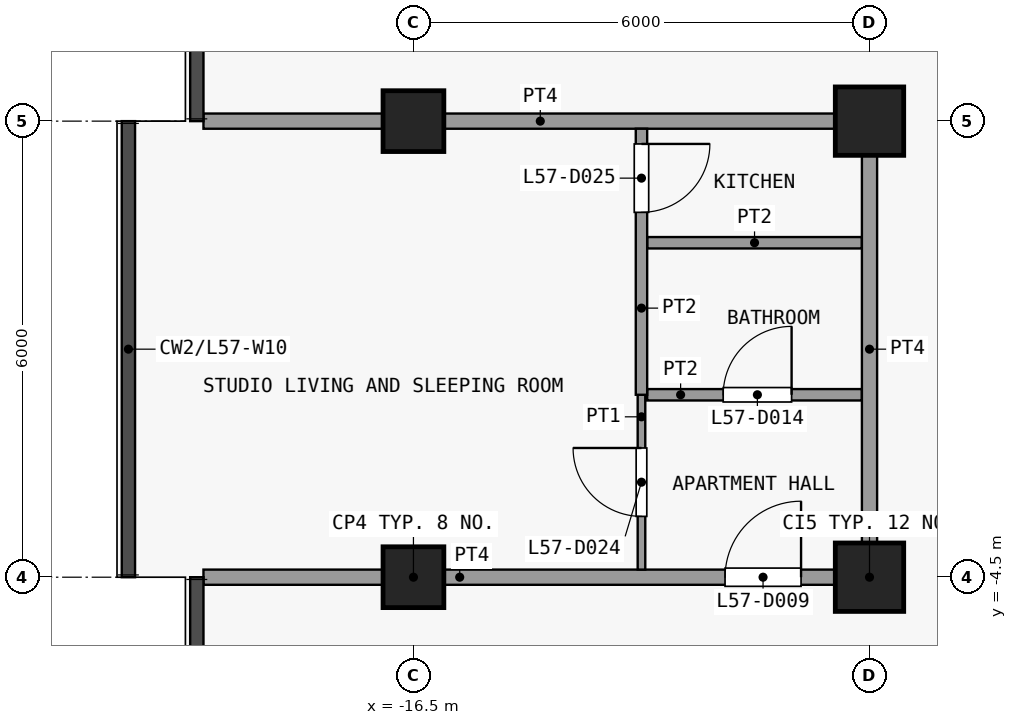
"""IFC4 building model, lengths in metres.
Left out: names, types, materials, properties, quantities, classifications, styles, units other than length and angle.
Written with IfcOpenShell. Run it as: python <this file> out.ifc"""

import sys

from ifc_helpers import new_model, si_unit, direction, frame, frame_2d, origin, origin_2d, place, context, subcontext, project, spatial, rectangle, extrude, element, fill, save


model = new_model("IFC4")
c1 = context("Model", 3, precision=1e-05, world=origin(), true_north=direction((0.0, 1.0)))
c2 = subcontext(c1, "Body", "Model", "MODEL_VIEW")
j1 = project(units=[si_unit("LENGTHUNIT", "METRE"), si_unit("PLANEANGLEUNIT", "RADIAN")], contexts=[c1])
p1 = place(None, origin())
s1 = spatial("IfcSite", under=j1, at=p1, CompositionType="ELEMENT")
p2 = place(p1, origin())
s2 = spatial("IfcBuilding", under=s1, at=p2, CompositionType="ELEMENT")
p3 = place(p2, frame((0.0, 0.0, 226.7)))
s3 = spatial("IfcBuildingStorey", under=s2, at=p3, CompositionType="ELEMENT", Elevation=226.7)
for number, where, z_axis, x_axis in (
    (1, (-16.5, -4.5, 0.0), (0.0, 0.0, 1.0), (1.0, 0.0, 0.0)),
    (2, (-16.5, 1.5, 0.0), (0.0, 0.0, 1.0), (1.0, 0.0, 0.0)),
):
    element("IfcColumn", number, at=place(p3, frame(where, z_axis=z_axis, x_axis=x_axis)), inside=s3, PredefinedType="COLUMN", context=c2, shape_type="SweptSolid", body=[
        extrude(rectangle(XDim=0.8, YDim=0.8, at=origin_2d()), origin(), (0.0, 0.0, 1.0), 3.6),
    ])
for number, where, z_axis, x_axis in (
    (3, (-10.5, -4.5, 0.0), (0.0, 0.0, 1.0), (1.0, 0.0, 0.0)),
    (4, (-10.5, 1.5, 0.0), (0.0, 0.0, 1.0), (1.0, 0.0, 0.0)),
):
    element("IfcColumn", number, at=place(p3, frame(where, z_axis=z_axis, x_axis=x_axis)), inside=s3, PredefinedType="COLUMN", context=c2, shape_type="SweptSolid", body=[
        extrude(rectangle(XDim=0.9, YDim=0.9, at=origin_2d()), origin(), (0.0, 0.0, 1.0), 3.6),
    ])
p4 = place(p3, frame((-19.262, -4.5, 0.0), z_axis=(0.0, 0.0, 1.0), x_axis=(1.0, 0.0, 0.0)))
e5 = element("IfcWall", 5, at=p4, inside=s3, PredefinedType="PARTITIONING", context=c2, shape_type="SweptSolid", body=[
    extrude(rectangle(XDim=8.863, YDim=0.2, at=frame_2d((4.431, 0.0))), origin(), (0.0, 0.0, 1.0), 3.3),
])
p5 = place(p4, frame((6.862, 0.0, 0.0)))
e6 = element("IfcOpeningElement", 6, at=p5, cuts=e5, PredefinedType="OPENING", context=c2, shape_type="SweptSolid", body=[
    extrude(rectangle(XDim=1.0, YDim=2.1, at=frame_2d((0.5, 1.05))), frame((0.0, 0.11, 0.0), z_axis=(0.0, -1.0, 0.0), x_axis=(1.0, 0.0, 0.0)), (0.0, 0.0, 1.0), 0.22),
])
p6 = place(p3, frame((-13.425, -2.1, 0.0), z_axis=(0.0, 0.0, 1.0), x_axis=(1.0, 0.0, 0.0)))
e7 = element("IfcWall", 7, at=p6, inside=s3, PredefinedType="PARTITIONING", context=c2, shape_type="SweptSolid", body=[
    extrude(rectangle(XDim=2.825, YDim=0.15, at=frame_2d((1.413, 0.0))), origin(), (0.0, 0.0, 1.0), 3.3),
])
p7 = place(p6, frame((1.0, 0.0, 0.0)))
e8 = element("IfcOpeningElement", 8, at=p7, cuts=e7, PredefinedType="OPENING", context=c2, shape_type="SweptSolid", body=[
    extrude(rectangle(XDim=0.9, YDim=2.1, at=frame_2d((0.45, 1.05))), frame((0.0, 0.085, 0.0), z_axis=(0.0, -1.0, 0.0), x_axis=(1.0, 0.0, 0.0)), (0.0, 0.0, 1.0), 0.17),
])
p8 = place(p3, frame((-13.425, -0.1, 0.0), z_axis=(0.0, 0.0, 1.0), x_axis=(1.0, 0.0, 0.0)))
e9 = element("IfcWall", 9, at=p8, inside=s3, PredefinedType="PARTITIONING", context=c2, shape_type="SweptSolid", body=[
    extrude(rectangle(XDim=2.825, YDim=0.15, at=frame_2d((1.413, 0.0))), origin(), (0.0, 0.0, 1.0), 3.3),
])
p9 = place(p3, frame((-19.262, 1.5, 0.0), z_axis=(0.0, 0.0, 1.0), x_axis=(1.0, 0.0, 0.0)))
e10 = element("IfcWall", 10, at=p9, inside=s3, PredefinedType="PARTITIONING", context=c2, shape_type="SweptSolid", body=[
    extrude(rectangle(XDim=8.863, YDim=0.2, at=frame_2d((4.431, 0.0))), origin(), (0.0, 0.0, 1.0), 3.3),
])
p10 = place(p3, frame((-13.5, -4.4, 0.0), z_axis=(0.0, 0.0, 1.0), x_axis=(0.0, 1.0, 0.0)))
e11 = element("IfcWall", 11, at=p10, inside=s3, PredefinedType="PARTITIONING", context=c2, shape_type="SweptSolid", body=[
    extrude(rectangle(XDim=2.3, YDim=0.1, at=frame_2d((1.15, 0.0))), origin(), (0.0, 0.0, 1.0), 3.3),
])
p11 = place(p10, frame((0.7, 0.0, 0.0)))
e12 = element("IfcOpeningElement", 12, at=p11, cuts=e11, PredefinedType="OPENING", context=c2, shape_type="SweptSolid", body=[
    extrude(rectangle(XDim=0.9, YDim=2.1, at=frame_2d((0.45, 1.05))), frame((0.0, 0.06, 0.0), z_axis=(0.0, -1.0, 0.0), x_axis=(1.0, 0.0, 0.0)), (0.0, 0.0, 1.0), 0.12),
])
p12 = place(p3, frame((-13.5, -2.1, 0.0), z_axis=(0.0, 0.0, 1.0), x_axis=(0.0, 1.0, 0.0)))
e13 = element("IfcWall", 13, at=p12, inside=s3, PredefinedType="PARTITIONING", context=c2, shape_type="SweptSolid", body=[
    extrude(rectangle(XDim=3.5, YDim=0.15, at=frame_2d((1.75, 0.0))), origin(), (0.0, 0.0, 1.0), 3.3),
])
p13 = place(p12, frame((2.4, 0.0, 0.0)))
e14 = element("IfcOpeningElement", 14, at=p13, cuts=e13, PredefinedType="OPENING", context=c2, shape_type="SweptSolid", body=[
    extrude(rectangle(XDim=0.9, YDim=2.1, at=frame_2d((0.45, 1.05))), frame((0.0, 0.085, 0.0), z_axis=(0.0, -1.0, 0.0), x_axis=(1.0, 0.0, 0.0)), (0.0, 0.0, 1.0), 0.17),
])
p14 = place(p3, frame((-10.5, -4.4, 0.0), z_axis=(0.0, 0.0, 1.0), x_axis=(0.0, 1.0, 0.0)))
e15 = element("IfcWall", 15, at=p14, inside=s3, PredefinedType="PARTITIONING", context=c2, shape_type="SweptSolid", body=[
    extrude(rectangle(XDim=5.8, YDim=0.2, at=frame_2d((2.9, 0.0))), origin(), (0.0, 0.0, 1.0), 3.3),
])
p15 = place(p5, origin())
e16 = element("IfcDoor", 16, at=p15, inside=s3, OperationType="SINGLE_SWING_LEFT", PredefinedType="DOOR", context=c2, shape_type="SweptSolid", body=[
    extrude(rectangle(XDim=1.0, YDim=2.1, at=frame_2d((0.5, 1.05))), frame((0.0, 0.025, 0.0), z_axis=(0.0, -1.0, 0.0), x_axis=(1.0, 0.0, 0.0)), (0.0, 0.0, 1.0), 0.05),
])
fill(e6, e16)
p16 = place(p7, origin())
e17 = element("IfcDoor", 17, at=p16, inside=s3, OperationType="SINGLE_SWING_LEFT", PredefinedType="DOOR", context=c2, shape_type="SweptSolid", body=[
    extrude(rectangle(XDim=0.9, YDim=2.1, at=frame_2d((0.45, 1.05))), frame((0.0, 0.025, 0.0), z_axis=(0.0, -1.0, 0.0), x_axis=(1.0, 0.0, 0.0)), (0.0, 0.0, 1.0), 0.05),
])
fill(e8, e17)
p17 = place(p11, origin())
e18 = element("IfcDoor", 18, at=p17, inside=s3, OperationType="SINGLE_SWING_LEFT", PredefinedType="DOOR", context=c2, shape_type="SweptSolid", body=[
    extrude(rectangle(XDim=0.9, YDim=2.1, at=frame_2d((0.45, 1.05))), frame((0.0, 0.025, 0.0), z_axis=(0.0, -1.0, 0.0), x_axis=(1.0, 0.0, 0.0)), (0.0, 0.0, 1.0), 0.05),
])
fill(e12, e18)
p18 = place(p13, origin())
e19 = element("IfcDoor", 19, at=p18, inside=s3, OperationType="SINGLE_SWING_RIGHT", PredefinedType="DOOR", context=c2, shape_type="SweptSolid", body=[
    extrude(rectangle(XDim=0.9, YDim=2.1, at=frame_2d((0.45, 1.05))), frame((0.0, 0.025, 0.0), z_axis=(0.0, -1.0, 0.0), x_axis=(1.0, 0.0, 0.0)), (0.0, 0.0, 1.0), 0.05),
])
fill(e14, e19)
save(model, sys.argv[1])
